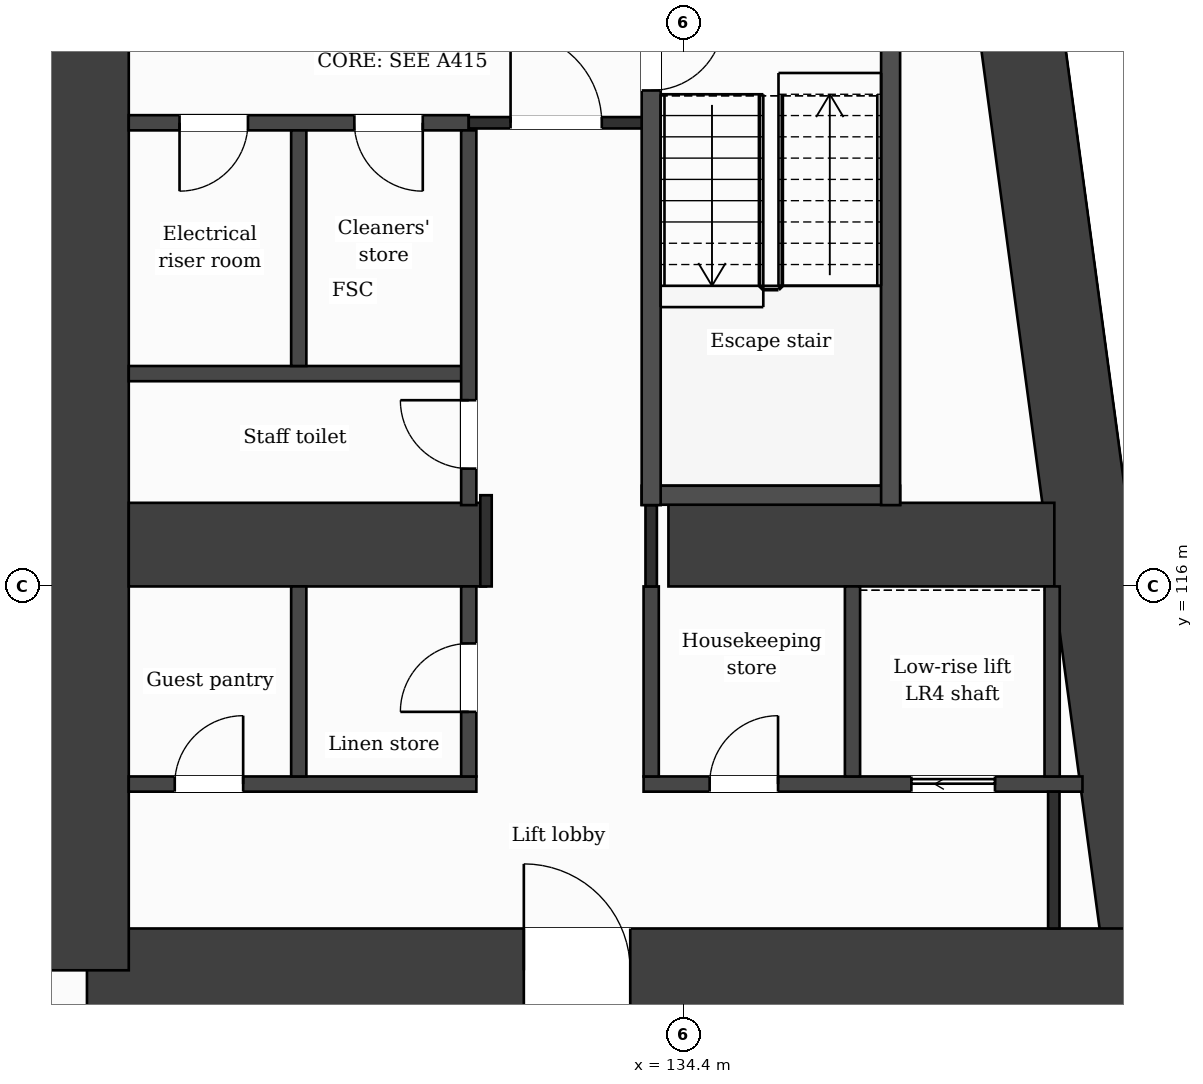
"""IFC4 building model, lengths in metres.
Left out: names, types, materials, properties, quantities, classifications, styles, units other than length and angle.
Written with IfcOpenShell. Run it as: python <this file> out.ifc"""

import sys

from ifc_helpers import new_model, si_unit, direction, frame, frame_2d, origin, place, context, subcontext, project, spatial, rectangle, extrude, element, fill, save


model = new_model("IFC4")
c1 = context("Model", 3, precision=1e-05, world=origin(), true_north=direction((0.0, 1.0)))
c2 = subcontext(c1, "Body", "Model", "MODEL_VIEW")
j1 = project(units=[si_unit("LENGTHUNIT", "METRE"), si_unit("PLANEANGLEUNIT", "RADIAN")], contexts=[c1])
p1 = place(None, origin())
s1 = spatial("IfcSite", under=j1, at=p1, CompositionType="ELEMENT")
p2 = place(p1, origin())
s2 = spatial("IfcBuilding", under=s1, at=p2, CompositionType="ELEMENT")
p3 = place(p2, frame((0.0, 0.0, 67.0)))
s3 = spatial("IfcBuildingStorey", under=s2, at=p3, CompositionType="ELEMENT", Elevation=67.0)
p4 = place(p3, frame((137.688, 131.85, 0.0), z_axis=(0.0, 0.0, 1.0), x_axis=(0.133411793472, -0.991060691059, 0.0)))
e1 = element("IfcWall", 1, at=p4, inside=s3, PredefinedType="SHEAR", context=c2, shape_type="SweptSolid", body=[
    extrude(rectangle(XDim=21.089, YDim=1.1, at=frame_2d((10.544, 0.0))), origin(), (0.0, 0.0, 1.0), 3.5),
])
p5 = place(p3, frame((140.502, 110.95, 0.0), z_axis=(0.0, 0.0, 1.0), x_axis=(-1.0, 0.0, 0.0)))
e2 = element("IfcWall", 2, at=p5, inside=s3, PredefinedType="SHEAR", context=c2, shape_type="SweptSolid", body=[
    extrude(rectangle(XDim=13.952, YDim=1.1, at=frame_2d((6.976, 0.0))), origin(), (0.0, 0.0, 1.0), 3.5),
])
p6 = place(p5, frame((6.804, 0.0, 0.0)))
e3 = element("IfcOpeningElement", 3, at=p6, cuts=e2, PredefinedType="OPENING", context=c2, shape_type="SweptSolid", body=[
    extrude(rectangle(XDim=1.4, YDim=2.1, at=frame_2d((0.7, 1.05))), frame((0.0, 0.56, 0.0), z_axis=(0.0, -1.0, 0.0), x_axis=(1.0, 0.0, 0.0)), (0.0, 0.0, 1.0), 1.12),
])
p7 = place(p3, frame((126.55, 110.95, 0.0), z_axis=(0.0, 0.0, 1.0), x_axis=(0.0, 1.0, 0.0)))
e4 = element("IfcWall", 4, at=p7, inside=s3, PredefinedType="SHEAR", context=c2, shape_type="SweptSolid", body=[
    extrude(rectangle(XDim=20.9, YDim=1.1, at=frame_2d((10.45, 0.0))), origin(), (0.0, 0.0, 1.0), 3.5),
])
p8 = place(p3, frame((127.1, 116.55, 0.0), z_axis=(0.0, 0.0, 1.0), x_axis=(1.0, 0.0, 0.0)))
e5 = element("IfcWall", 5, at=p8, inside=s3, PredefinedType="SHEAR", context=c2, shape_type="SweptSolid", body=[
    extrude(rectangle(XDim=4.7, YDim=1.1, at=frame_2d((2.35, 0.0))), origin(), (0.0, 0.0, 1.0), 3.5),
])
p9 = place(p3, frame((134.2, 116.55, 0.0), z_axis=(0.0, 0.0, 1.0), x_axis=(1.0, 0.0, 0.0)))
e6 = element("IfcWall", 6, at=p9, inside=s3, PredefinedType="SHEAR", context=c2, shape_type="SweptSolid", body=[
    extrude(rectangle(XDim=5.077, YDim=1.1, at=frame_2d((2.539, 0.0))), origin(), (0.0, 0.0, 1.0), 3.5),
])
p10 = place(p3, frame((127.1, 113.4, 0.0), z_axis=(0.0, 0.0, 1.0), x_axis=(1.0, 0.0, 0.0)))
e7 = element("IfcWall", 7, at=p10, inside=s3, PredefinedType="PARTITIONING", context=c2, shape_type="SweptSolid", body=[
    extrude(rectangle(XDim=4.573, YDim=0.2, at=frame_2d((2.287, 0.0))), origin(), (0.0, 0.0, 1.0), 3.18),
])
p11 = place(p10, frame((0.605, 0.0, 0.0)))
e8 = element("IfcOpeningElement", 8, at=p11, cuts=e7, PredefinedType="OPENING", context=c2, shape_type="SweptSolid", body=[
    extrude(rectangle(XDim=0.9, YDim=2.1, at=frame_2d((0.45, 1.05))), frame((0.0, 0.11, 0.0), z_axis=(0.0, -1.0, 0.0), x_axis=(1.0, 0.0, 0.0)), (0.0, 0.0, 1.0), 0.22),
])
p12 = place(p3, frame((133.873, 113.4, 0.0), z_axis=(0.0, 0.0, 1.0), x_axis=(1.0, 0.0, 0.0)))
e9 = element("IfcWall", 9, at=p12, inside=s3, PredefinedType="PARTITIONING", context=c2, shape_type="SweptSolid", body=[
    extrude(rectangle(XDim=5.774, YDim=0.2, at=frame_2d((2.887, 0.0))), origin(), (0.0, 0.0, 1.0), 3.18),
])
p13 = place(p12, frame((3.523, 0.0, 0.0)))
e10 = element("IfcOpeningElement", 10, at=p13, cuts=e9, PredefinedType="OPENING", context=c2, shape_type="SweptSolid", body=[
    extrude(rectangle(XDim=1.1, YDim=2.1, at=frame_2d((0.55, 1.05))), frame((0.0, 0.11, 0.0), z_axis=(0.0, -1.0, 0.0), x_axis=(1.0, 0.0, 0.0)), (0.0, 0.0, 1.0), 0.22),
])
p14 = place(p12, frame((0.869, 0.0, 0.0)))
e11 = element("IfcOpeningElement", 11, at=p14, cuts=e9, PredefinedType="OPENING", context=c2, shape_type="SweptSolid", body=[
    extrude(rectangle(XDim=0.9, YDim=2.1, at=frame_2d((0.45, 1.05))), frame((0.0, 0.11, 0.0), z_axis=(0.0, -1.0, 0.0), x_axis=(1.0, 0.0, 0.0)), (0.0, 0.0, 1.0), 0.22),
])
p15 = place(p3, frame((133.848, 117.2, 0.0), z_axis=(0.0, 0.0, 1.0), x_axis=(1.0, 0.0, 0.0)))
e12 = element("IfcWall", 12, at=p15, inside=s3, PredefinedType="PARTITIONING", context=c2, shape_type="SweptSolid", body=[
    extrude(rectangle(XDim=3.4, YDim=0.25, at=frame_2d((1.7, 0.0))), origin(), (0.0, 0.0, 1.0), 3.18),
])
p16 = place(p3, frame((127.1, 118.8, 0.0), z_axis=(0.0, 0.0, 1.0), x_axis=(1.0, 0.0, 0.0)))
e13 = element("IfcWall", 13, at=p16, inside=s3, PredefinedType="PARTITIONING", context=c2, shape_type="SweptSolid", body=[
    extrude(rectangle(XDim=4.473, YDim=0.2, at=frame_2d((2.236, 0.0))), origin(), (0.0, 0.0, 1.0), 3.18),
])
p17 = place(p3, frame((127.1, 122.1, 0.0), z_axis=(0.0, 0.0, 1.0), x_axis=(1.0, 0.0, 0.0)))
e14 = element("IfcWall", 14, at=p17, inside=s3, PredefinedType="PARTITIONING", context=c2, shape_type="SweptSolid", body=[
    extrude(rectangle(XDim=4.473, YDim=0.2, at=frame_2d((2.236, 0.0))), origin(), (0.0, 0.0, 1.0), 3.18),
])
p18 = place(p17, frame((2.968, 0.0, 0.0)))
e15 = element("IfcOpeningElement", 15, at=p18, cuts=e14, PredefinedType="OPENING", context=c2, shape_type="SweptSolid", body=[
    extrude(rectangle(XDim=0.9, YDim=2.1, at=frame_2d((0.45, 1.05))), frame((0.0, 0.11, 0.0), z_axis=(0.0, -1.0, 0.0), x_axis=(1.0, 0.0, 0.0)), (0.0, 0.0, 1.0), 0.22),
])
p19 = place(p17, frame((0.668, 0.0, 0.0)))
e16 = element("IfcOpeningElement", 16, at=p19, cuts=e14, PredefinedType="OPENING", context=c2, shape_type="SweptSolid", body=[
    extrude(rectangle(XDim=0.9, YDim=2.1, at=frame_2d((0.45, 1.05))), frame((0.0, 0.11, 0.0), z_axis=(0.0, -1.0, 0.0), x_axis=(1.0, 0.0, 0.0)), (0.0, 0.0, 1.0), 0.22),
])
p20 = place(p3, frame((131.573, 122.1, 0.0), z_axis=(0.0, 0.0, 1.0), x_axis=(1.0, 0.0, 0.0)))
e17 = element("IfcWall", 17, at=p20, inside=s3, PredefinedType="PARTITIONING", context=c2, shape_type="SweptSolid", body=[
    extrude(rectangle(XDim=2.4, YDim=0.15, at=frame_2d((1.2, 0.0))), origin(), (0.0, 0.0, 1.0), 3.18),
])
p21 = place(p20, frame((0.55, 0.0, 0.0)))
e18 = element("IfcOpeningElement", 18, at=p21, cuts=e17, PredefinedType="OPENING", context=c2, shape_type="SweptSolid", body=[
    extrude(rectangle(XDim=1.2, YDim=2.1, at=frame_2d((0.6, 1.05))), frame((0.0, 0.085, 0.0), z_axis=(0.0, -1.0, 0.0), x_axis=(1.0, 0.0, 0.0)), (0.0, 0.0, 1.0), 0.17),
])
p22 = place(p3, frame((129.336, 113.5, 0.0), z_axis=(0.0, 0.0, 1.0), x_axis=(0.0, 1.0, 0.0)))
e19 = element("IfcWall", 19, at=p22, inside=s3, PredefinedType="PARTITIONING", context=c2, shape_type="SweptSolid", body=[
    extrude(rectangle(XDim=2.5, YDim=0.2, at=frame_2d((1.25, 0.0))), origin(), (0.0, 0.0, 1.0), 3.18),
])
p23 = place(p3, frame((129.336, 118.9, 0.0), z_axis=(0.0, 0.0, 1.0), x_axis=(0.0, 1.0, 0.0)))
e20 = element("IfcWall", 20, at=p23, inside=s3, PredefinedType="PARTITIONING", context=c2, shape_type="SweptSolid", body=[
    extrude(rectangle(XDim=3.1, YDim=0.2, at=frame_2d((1.55, 0.0))), origin(), (0.0, 0.0, 1.0), 3.18),
])
p24 = place(p3, frame((131.573, 113.5, 0.0), z_axis=(0.0, 0.0, 1.0), x_axis=(0.0, 1.0, 0.0)))
e21 = element("IfcWall", 21, at=p24, inside=s3, PredefinedType="PARTITIONING", context=c2, shape_type="SweptSolid", body=[
    extrude(rectangle(XDim=2.5, YDim=0.2, at=frame_2d((1.25, 0.0))), origin(), (0.0, 0.0, 1.0), 3.18),
])
p25 = place(p24, frame((0.85, 0.0, 0.0)))
e22 = element("IfcOpeningElement", 22, at=p25, cuts=e21, PredefinedType="OPENING", context=c2, shape_type="SweptSolid", body=[
    extrude(rectangle(XDim=0.9, YDim=2.1, at=frame_2d((0.45, 1.05))), frame((0.0, 0.11, 0.0), z_axis=(0.0, -1.0, 0.0), x_axis=(1.0, 0.0, 0.0)), (0.0, 0.0, 1.0), 0.22),
])
p26 = place(p3, frame((131.573, 117.07, 0.0), z_axis=(0.0, 0.0, 1.0), x_axis=(0.0, 1.0, 0.0)))
e23 = element("IfcWall", 23, at=p26, inside=s3, PredefinedType="PARTITIONING", context=c2, shape_type="SweptSolid", body=[
    extrude(rectangle(XDim=4.93, YDim=0.2, at=frame_2d((2.465, 0.0))), origin(), (0.0, 0.0, 1.0), 3.18),
])
p27 = place(p26, frame((0.48, 0.0, 0.0)))
e24 = element("IfcOpeningElement", 24, at=p27, cuts=e23, PredefinedType="OPENING", context=c2, shape_type="SweptSolid", body=[
    extrude(rectangle(XDim=0.9, YDim=2.1, at=frame_2d((0.45, 1.05))), frame((0.0, 0.11, 0.0), z_axis=(0.0, -1.0, 0.0), x_axis=(1.0, 0.0, 0.0)), (0.0, 0.0, 1.0), 0.22),
])
p28 = place(p3, frame((131.8, 116.0, 0.0), z_axis=(0.0, 0.0, 1.0), x_axis=(0.0, 1.0, 0.0)))
e25 = element("IfcWall", 25, at=p28, inside=s3, PredefinedType="PARTITIONING", context=c2, shape_type="SweptSolid", body=[
    extrude(rectangle(XDim=1.2, YDim=0.15, at=frame_2d((0.6, 0.0))), origin(), (0.0, 0.0, 1.0), 3.18),
])
p29 = place(p3, frame((133.973, 113.5, 0.0), z_axis=(0.0, 0.0, 1.0), x_axis=(0.0, 1.0, 0.0)))
e26 = element("IfcWall", 26, at=p29, inside=s3, PredefinedType="PARTITIONING", context=c2, shape_type="SweptSolid", body=[
    extrude(rectangle(XDim=2.5, YDim=0.2, at=frame_2d((1.25, 0.0))), origin(), (0.0, 0.0, 1.0), 3.18),
])
p30 = place(p3, frame((133.973, 116.0, 0.0), z_axis=(0.0, 0.0, 1.0), x_axis=(0.0, 1.0, 0.0)))
e27 = element("IfcWall", 27, at=p30, inside=s3, PredefinedType="PARTITIONING", context=c2, shape_type="SweptSolid", body=[
    extrude(rectangle(XDim=1.07, YDim=0.15, at=frame_2d((0.535, 0.0))), origin(), (0.0, 0.0, 1.0), 3.18),
])
p31 = place(p3, frame((133.973, 117.07, 0.0), z_axis=(0.0, 0.0, 1.0), x_axis=(0.0, 1.0, 0.0)))
e28 = element("IfcWall", 28, at=p31, inside=s3, PredefinedType="PARTITIONING", context=c2, shape_type="SweptSolid", body=[
    extrude(rectangle(XDim=6.755, YDim=0.25, at=frame_2d((3.377, 0.0))), origin(), (0.0, 0.0, 1.0), 3.18),
])
p32 = place(p31, frame((5.455, 0.0, 0.0)))
e29 = element("IfcOpeningElement", 29, at=p32, cuts=e28, PredefinedType="OPENING", context=c2, shape_type="SweptSolid", body=[
    extrude(rectangle(XDim=0.95, YDim=2.1, at=frame_2d((0.475, 1.05))), frame((0.0, 0.135, 0.0), z_axis=(0.0, -1.0, 0.0), x_axis=(1.0, 0.0, 0.0)), (0.0, 0.0, 1.0), 0.27),
])
p33 = place(p3, frame((136.622, 113.5, 0.0), z_axis=(0.0, 0.0, 1.0), x_axis=(0.0, 1.0, 0.0)))
e30 = element("IfcWall", 30, at=p33, inside=s3, PredefinedType="PARTITIONING", context=c2, shape_type="SweptSolid", body=[
    extrude(rectangle(XDim=2.5, YDim=0.2, at=frame_2d((1.25, 0.0))), origin(), (0.0, 0.0, 1.0), 3.18),
])
p34 = place(p3, frame((137.123, 117.07, 0.0), z_axis=(0.0, 0.0, 1.0), x_axis=(0.0, 1.0, 0.0)))
e31 = element("IfcWall", 31, at=p34, inside=s3, PredefinedType="PARTITIONING", context=c2, shape_type="SweptSolid", body=[
    extrude(rectangle(XDim=6.755, YDim=0.25, at=frame_2d((3.377, 0.0))), origin(), (0.0, 0.0, 1.0), 3.18),
])
p35 = place(p3, frame((139.248, 113.5, 0.0), z_axis=(0.0, 0.0, 1.0), x_axis=(0.0, 1.0, 0.0)))
e32 = element("IfcWall", 32, at=p35, inside=s3, PredefinedType="PARTITIONING", context=c2, shape_type="SweptSolid", body=[
    extrude(rectangle(XDim=2.5, YDim=0.2, at=frame_2d((1.25, 0.0))), origin(), (0.0, 0.0, 1.0), 3.18),
])
p36 = place(p3, frame((139.27, 111.5, 0.0), z_axis=(0.0, 0.0, 1.0), x_axis=(0.0, 1.0, 0.0)))
e33 = element("IfcWall", 33, at=p36, inside=s3, PredefinedType="PARTITIONING", context=c2, shape_type="SweptSolid", body=[
    extrude(rectangle(XDim=1.8, YDim=0.15, at=frame_2d((0.9, 0.0))), origin(), (0.0, 0.0, 1.0), 3.18),
])
p37 = place(p21, origin())
e34 = element("IfcDoor", 34, at=p37, inside=s3, OperationType="SINGLE_SWING_LEFT", PredefinedType="DOOR", context=c2, shape_type="SweptSolid", body=[
    extrude(rectangle(XDim=1.2, YDim=2.1, at=frame_2d((0.6, 1.05))), frame((0.0, 0.025, 0.0), z_axis=(0.0, -1.0, 0.0), x_axis=(1.0, 0.0, 0.0)), (0.0, 0.0, 1.0), 0.05),
])
fill(e18, e34)
p38 = place(p18, origin())
e35 = element("IfcDoor", 35, at=p38, inside=s3, OperationType="SINGLE_SWING_RIGHT", PredefinedType="DOOR", context=c2, shape_type="SweptSolid", body=[
    extrude(rectangle(XDim=0.9, YDim=2.1, at=frame_2d((0.45, 1.05))), frame((0.0, 0.025, 0.0), z_axis=(0.0, -1.0, 0.0), x_axis=(1.0, 0.0, 0.0)), (0.0, 0.0, 1.0), 0.05),
])
fill(e15, e35)
p39 = place(p19, origin())
e36 = element("IfcDoor", 36, at=p39, inside=s3, OperationType="SINGLE_SWING_LEFT", PredefinedType="DOOR", context=c2, shape_type="SweptSolid", body=[
    extrude(rectangle(XDim=0.9, YDim=2.1, at=frame_2d((0.45, 1.05))), frame((0.0, 0.025, 0.0), z_axis=(0.0, -1.0, 0.0), x_axis=(1.0, 0.0, 0.0)), (0.0, 0.0, 1.0), 0.05),
])
fill(e16, e36)
p40 = place(p32, origin())
e37 = element("IfcDoor", 37, at=p40, inside=s3, OperationType="SINGLE_SWING_RIGHT", PredefinedType="DOOR", context=c2, shape_type="SweptSolid", body=[
    extrude(rectangle(XDim=0.95, YDim=2.1, at=frame_2d((0.475, 1.05))), frame((0.0, 0.025, 0.0), z_axis=(0.0, -1.0, 0.0), x_axis=(1.0, 0.0, 0.0)), (0.0, 0.0, 1.0), 0.05),
])
fill(e29, e37)
p41 = place(p27, origin())
e38 = element("IfcDoor", 38, at=p41, inside=s3, OperationType="SINGLE_SWING_RIGHT", PredefinedType="DOOR", context=c2, shape_type="SweptSolid", body=[
    extrude(rectangle(XDim=0.9, YDim=2.1, at=frame_2d((0.45, 1.05))), frame((0.0, 0.025, 0.0), z_axis=(0.0, -1.0, 0.0), x_axis=(1.0, 0.0, 0.0)), (0.0, 0.0, 1.0), 0.05),
])
fill(e24, e38)
p42 = place(p13, origin())
e39 = element("IfcDoor", 39, at=p42, inside=s3, OperationType="SLIDING_TO_LEFT", PredefinedType="DOOR", context=c2, shape_type="SweptSolid", body=[
    extrude(rectangle(XDim=1.1, YDim=2.1, at=frame_2d((0.55, 1.05))), frame((0.0, 0.025, 0.0), z_axis=(0.0, -1.0, 0.0), x_axis=(1.0, 0.0, 0.0)), (0.0, 0.0, 1.0), 0.05),
])
fill(e10, e39)
p43 = place(p14, origin())
e40 = element("IfcDoor", 40, at=p43, inside=s3, OperationType="SINGLE_SWING_RIGHT", PredefinedType="DOOR", context=c2, shape_type="SweptSolid", body=[
    extrude(rectangle(XDim=0.9, YDim=2.1, at=frame_2d((0.45, 1.05))), frame((0.0, 0.025, 0.0), z_axis=(0.0, -1.0, 0.0), x_axis=(1.0, 0.0, 0.0)), (0.0, 0.0, 1.0), 0.05),
])
fill(e11, e40)
p44 = place(p25, origin())
e41 = element("IfcDoor", 41, at=p44, inside=s3, OperationType="SINGLE_SWING_LEFT", PredefinedType="DOOR", context=c2, shape_type="SweptSolid", body=[
    extrude(rectangle(XDim=0.9, YDim=2.1, at=frame_2d((0.45, 1.05))), frame((0.0, 0.025, 0.0), z_axis=(0.0, -1.0, 0.0), x_axis=(1.0, 0.0, 0.0)), (0.0, 0.0, 1.0), 0.05),
])
fill(e22, e41)
p45 = place(p11, origin())
e42 = element("IfcDoor", 42, at=p45, inside=s3, OperationType="SINGLE_SWING_RIGHT", PredefinedType="DOOR", context=c2, shape_type="SweptSolid", body=[
    extrude(rectangle(XDim=0.9, YDim=2.1, at=frame_2d((0.45, 1.05))), frame((0.0, 0.025, 0.0), z_axis=(0.0, -1.0, 0.0), x_axis=(1.0, 0.0, 0.0)), (0.0, 0.0, 1.0), 0.05),
])
fill(e8, e42)
p46 = place(p6, origin())
e43 = element("IfcDoor", 43, at=p46, inside=s3, OperationType="SINGLE_SWING_RIGHT", PredefinedType="DOOR", context=c2, shape_type="SweptSolid", body=[
    extrude(rectangle(XDim=1.4, YDim=2.1, at=frame_2d((0.7, 1.05))), frame((0.0, 0.025, 0.0), z_axis=(0.0, -1.0, 0.0), x_axis=(1.0, 0.0, 0.0)), (0.0, 0.0, 1.0), 0.05),
])
fill(e3, e43)
save(model, sys.argv[1])
